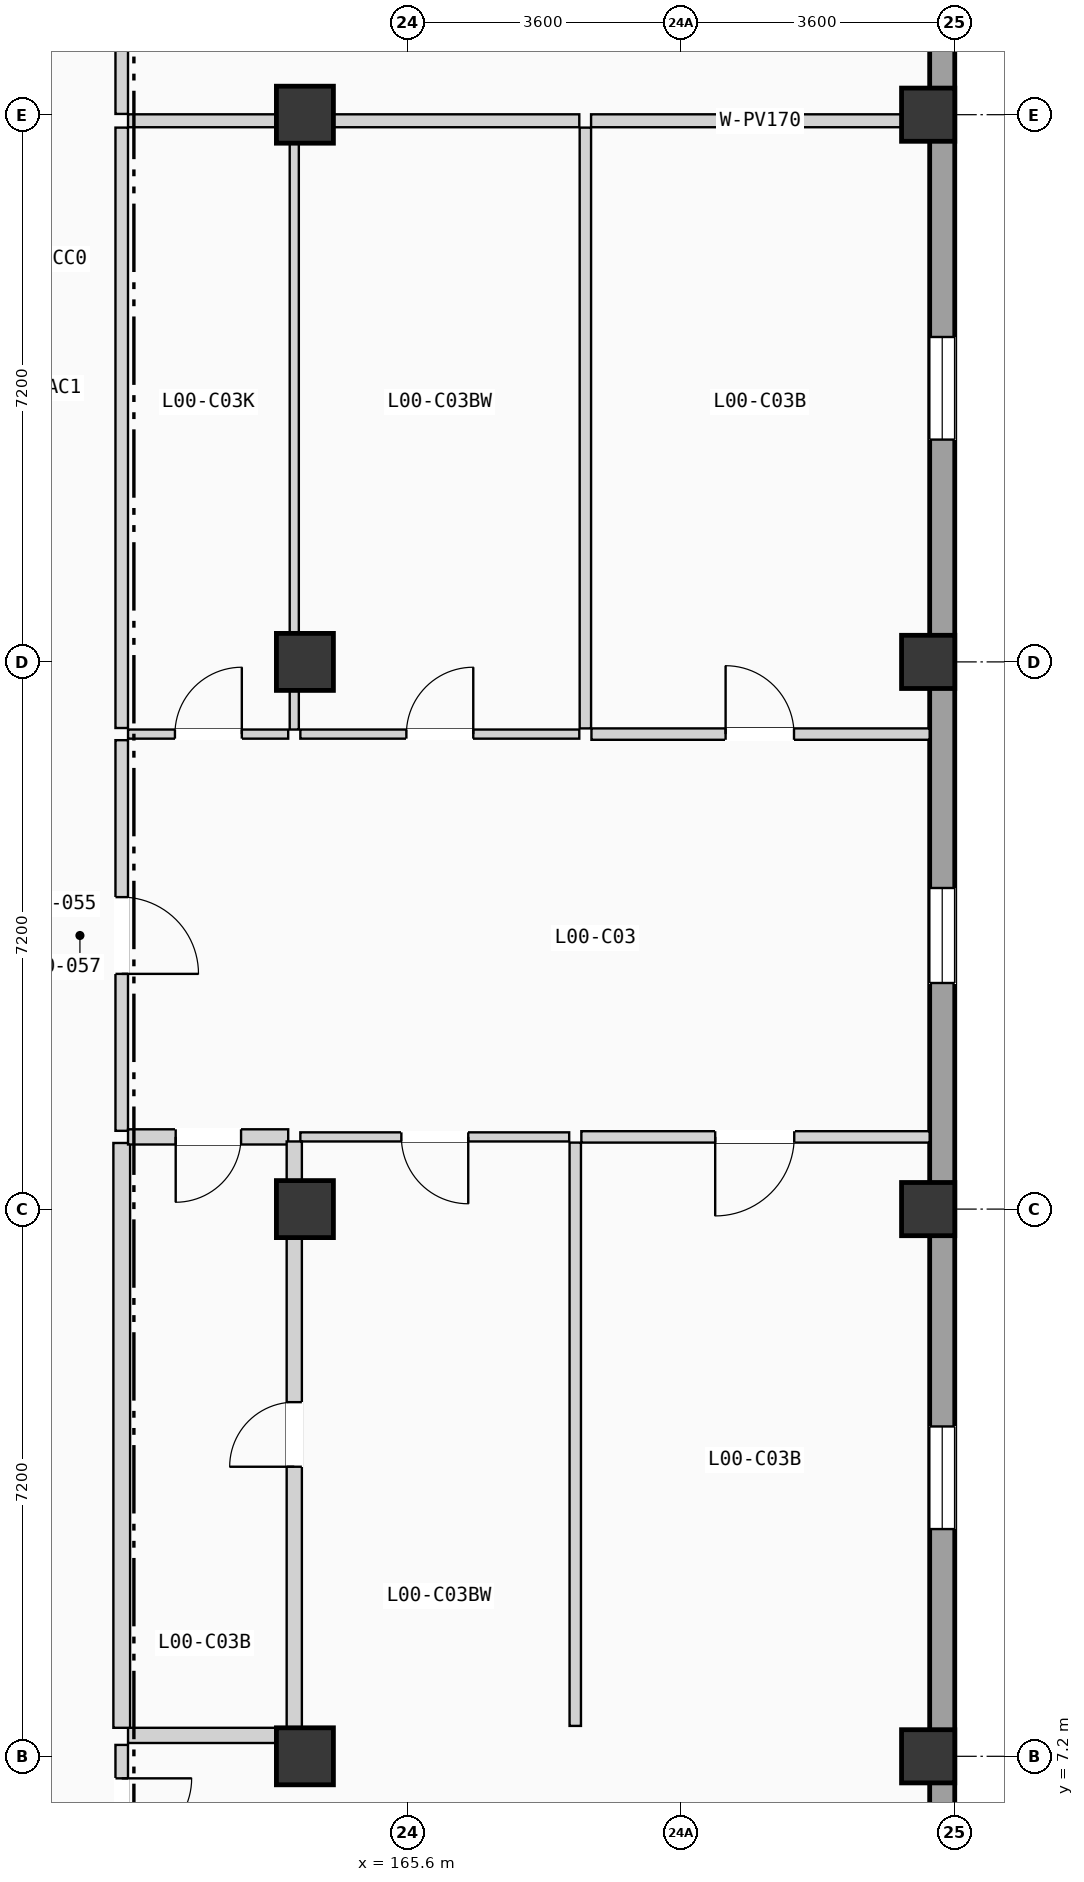
"""IFC4 building model, lengths in metres.
Left out: names, types, materials, properties, quantities, classifications, styles, units other than length and angle.
Written with IfcOpenShell. Run it as: python <this file> out.ifc"""

import sys

from ifc_helpers import new_model, si_unit, direction, frame, frame_2d, origin, origin_2d, place, context, subcontext, project, spatial, rectangle, extrude, element, fill, save


model = new_model("IFC4")
c1 = context("Model", 3, precision=1e-05, world=origin(), true_north=direction((0.0, 1.0)))
c2 = subcontext(c1, "Body", "Model", "MODEL_VIEW")
j1 = project(units=[si_unit("LENGTHUNIT", "METRE"), si_unit("PLANEANGLEUNIT", "RADIAN")], contexts=[c1])
p1 = place(None, origin())
s1 = spatial("IfcSite", under=j1, at=p1, CompositionType="ELEMENT")
p2 = place(p1, origin())
s2 = spatial("IfcBuilding", under=s1, at=p2, CompositionType="ELEMENT")
p3 = place(p2, origin())
s3 = spatial("IfcBuildingStorey", under=s2, at=p3, CompositionType="ELEMENT", Elevation=0.0)
for number, where, z_axis, x_axis in (
    (1, (164.25, 7.2, 0.0), (0.0, 0.0, 1.0), (1.0, 0.0, 0.0)),
    (2, (164.25, 14.4, 0.0), (0.0, 0.0, 1.0), (1.0, 0.0, 0.0)),
    (3, (164.25, 21.6, 0.0), (0.0, 0.0, 1.0), (1.0, 0.0, 0.0)),
    (4, (164.25, 28.8, 0.0), (0.0, 0.0, 1.0), (1.0, 0.0, 0.0)),
):
    element("IfcColumn", number, at=place(p3, frame(where, z_axis=z_axis, x_axis=x_axis)), inside=s3, PredefinedType="COLUMN", context=c2, shape_type="SweptSolid", body=[
        extrude(rectangle(XDim=0.75, YDim=0.75, at=origin_2d()), origin(), (0.0, 0.0, 1.0), 4.9),
    ])
for number, where, z_axis, x_axis in (
    (5, (172.45, 7.2, 0.0), (0.0, 0.0, 1.0), (1.0, 0.0, 0.0)),
    (6, (172.45, 14.4, 0.0), (0.0, 0.0, 1.0), (1.0, 0.0, 0.0)),
    (7, (172.45, 21.6, 0.0), (0.0, 0.0, 1.0), (1.0, 0.0, 0.0)),
    (8, (172.45, 28.8, 0.0), (0.0, 0.0, 1.0), (1.0, 0.0, 0.0)),
):
    element("IfcColumn", number, at=place(p3, frame(where, z_axis=z_axis, x_axis=x_axis)), inside=s3, PredefinedType="COLUMN", context=c2, shape_type="SweptSolid", body=[
        extrude(rectangle(XDim=0.7, YDim=0.7, at=origin_2d()), origin(), (0.0, 0.0, 1.0), 4.9),
    ])
p4 = place(p3, frame((172.635, 0.33, 0.0), z_axis=(0.0, 0.0, 1.0), x_axis=(0.0, 1.0, 0.0)))
e9 = element("IfcWall", 9, at=p4, inside=s3, PredefinedType="SOLIDWALL", context=c2, shape_type="SweptSolid", body=[
    extrude(rectangle(XDim=49.74, YDim=0.33, at=frame_2d((24.87, 0.0))), origin(), (0.0, 0.0, 1.0), 4.64),
])
p5 = place(p4, frame((31.17, 0.0, 0.0)))
e10 = element("IfcOpeningElement", 10, at=p5, cuts=e9, PredefinedType="OPENING", context=c2, shape_type="SweptSolid", body=[
    extrude(rectangle(XDim=1.8, YDim=2.35, at=frame_2d((0.9, 1.175))), frame((0.0, 0.175, 0.0), z_axis=(0.0, -1.0, 0.0), x_axis=(1.0, 0.0, 0.0)), (0.0, 0.0, 1.0), 0.35),
])
p6 = place(p4, frame((17.045, 0.0, 0.9)))
e11 = element("IfcOpeningElement", 11, at=p6, cuts=e9, PredefinedType="OPENING", context=c2, shape_type="SweptSolid", body=[
    extrude(rectangle(XDim=1.25, YDim=1.8, at=frame_2d((0.625, 0.9))), frame((0.0, 0.175, 0.0), z_axis=(0.0, -1.0, 0.0), x_axis=(1.0, 0.0, 0.0)), (0.0, 0.0, 1.0), 0.35),
])
p7 = place(p4, frame((9.86, 0.0, 0.9)))
e12 = element("IfcOpeningElement", 12, at=p7, cuts=e9, PredefinedType="OPENING", context=c2, shape_type="SweptSolid", body=[
    extrude(rectangle(XDim=1.35, YDim=1.2, at=frame_2d((0.675, 0.6))), frame((0.0, 0.175, 0.0), z_axis=(0.0, -1.0, 0.0), x_axis=(1.0, 0.0, 0.0)), (0.0, 0.0, 1.0), 0.35),
])
p8 = place(p4, frame((24.195, 0.0, 0.9)))
e13 = element("IfcOpeningElement", 13, at=p8, cuts=e9, PredefinedType="OPENING", context=c2, shape_type="SweptSolid", body=[
    extrude(rectangle(XDim=1.35, YDim=1.35, at=frame_2d((0.675, 0.675))), frame((0.0, 0.175, 0.0), z_axis=(0.0, -1.0, 0.0), x_axis=(1.0, 0.0, 0.0)), (0.0, 0.0, 1.0), 0.35),
])
p9 = place(p3, frame((161.84, 5.515, 0.0), z_axis=(0.0, 0.0, 1.0), x_axis=(0.0, 1.0, 0.0)))
e14 = element("IfcWall", 14, at=p9, inside=s3, PredefinedType="PARTITIONING", context=c2, shape_type="SweptSolid", body=[
    extrude(rectangle(XDim=1.835, YDim=0.165, at=frame_2d((0.917, 0.0))), origin(), (0.0, 0.0, 1.0), 3.84),
])
p10 = place(p9, frame((0.475, 0.0, 0.0)))
e15 = element("IfcOpeningElement", 15, at=p10, cuts=e14, PredefinedType="OPENING", context=c2, shape_type="SweptSolid", body=[
    extrude(rectangle(XDim=0.92, YDim=2.04, at=frame_2d((0.46, 1.02))), frame((0.0, 0.093, 0.0), z_axis=(0.0, -1.0, 0.0), x_axis=(1.0, 0.0, 0.0)), (0.0, 0.0, 1.0), 0.185),
])
p11 = place(p3, frame((161.923, 7.475, 0.0), z_axis=(0.0, 0.0, 1.0), x_axis=(1.0, 0.0, 0.0)))
e16 = element("IfcWall", 16, at=p11, inside=s3, PredefinedType="PLUMBINGWALL", context=c2, shape_type="SweptSolid", body=[
    extrude(rectangle(XDim=2.107, YDim=0.2, at=frame_2d((1.053, 0.0))), origin(), (0.0, 0.0, 1.0), 3.84),
])
p12 = place(p3, frame((161.84, 15.43, 0.0), z_axis=(0.0, 0.0, 1.0), x_axis=(0.0, 1.0, 0.0)))
e17 = element("IfcWall", 17, at=p12, inside=s3, PredefinedType="PARTITIONING", context=c2, shape_type="SweptSolid", body=[
    extrude(rectangle(XDim=5.14, YDim=0.165, at=frame_2d((2.57, 0.0))), origin(), (0.0, 0.0, 1.0), 3.84),
])
p13 = place(p12, frame((2.065, 0.0, 0.0)))
e18 = element("IfcOpeningElement", 18, at=p13, cuts=e17, PredefinedType="OPENING", context=c2, shape_type="SweptSolid", body=[
    extrude(rectangle(XDim=1.01, YDim=2.11, at=frame_2d((0.505, 1.055))), frame((0.0, 0.093, 0.0), z_axis=(0.0, -1.0, 0.0), x_axis=(1.0, 0.0, 0.0)), (0.0, 0.0, 1.0), 0.185),
])
p14 = place(p3, frame((161.84, 7.575, 0.0), z_axis=(0.0, 0.0, 1.0), x_axis=(0.0, 1.0, 0.0)))
e19 = element("IfcWall", 19, at=p14, inside=s3, PredefinedType="PLUMBINGWALL", context=c2, shape_type="SweptSolid", body=[
    extrude(rectangle(XDim=7.695, YDim=0.22, at=frame_2d((3.848, 0.0))), origin(), (0.0, 0.0, 1.0), 3.84),
])
p15 = place(p3, frame((161.84, 20.73, 0.0), z_axis=(0.0, 0.0, 1.0), x_axis=(0.0, 1.0, 0.0)))
e20 = element("IfcWall", 20, at=p15, inside=s3, PredefinedType="PARTITIONING", context=c2, shape_type="SweptSolid", body=[
    extrude(rectangle(XDim=7.9, YDim=0.165, at=frame_2d((3.95, 0.0))), origin(), (0.0, 0.0, 1.0), 3.84),
])
p16 = place(p3, frame((161.84, 28.81, 0.0), z_axis=(0.0, 0.0, 1.0), x_axis=(0.0, 1.0, 0.0)))
e21 = element("IfcWall", 21, at=p16, inside=s3, PredefinedType="PARTITIONING", context=c2, shape_type="SweptSolid", body=[
    extrude(rectangle(XDim=13.99, YDim=0.165, at=frame_2d((6.995, 0.0))), origin(), (0.0, 0.0, 1.0), 3.84),
])
p17 = place(p16, frame((6.49, 0.0, 0.0)))
e22 = element("IfcOpeningElement", 22, at=p17, cuts=e21, PredefinedType="OPENING", context=c2, shape_type="SweptSolid", body=[
    extrude(rectangle(XDim=1.01, YDim=2.11, at=frame_2d((0.505, 1.055))), frame((0.0, 0.093, 0.0), z_axis=(0.0, -1.0, 0.0), x_axis=(1.0, 0.0, 0.0)), (0.0, 0.0, 1.0), 0.185),
])
p18 = place(p3, frame((161.923, 15.35, 0.0), z_axis=(0.0, 0.0, 1.0), x_axis=(1.0, 0.0, 0.0)))
e23 = element("IfcWall", 23, at=p18, inside=s3, PredefinedType="PLUMBINGWALL", context=c2, shape_type="SweptSolid", body=[
    extrude(rectangle(XDim=2.107, YDim=0.2, at=frame_2d((1.053, 0.0))), origin(), (0.0, 0.0, 1.0), 3.84),
])
p19 = place(p18, frame((0.627, 0.0, 0.0)))
e24 = element("IfcOpeningElement", 24, at=p19, cuts=e23, PredefinedType="OPENING", context=c2, shape_type="SweptSolid", body=[
    extrude(rectangle(XDim=0.86, YDim=2.0, at=frame_2d((0.43, 1.0))), frame((0.0, 0.11, 0.0), z_axis=(0.0, -1.0, 0.0), x_axis=(1.0, 0.0, 0.0)), (0.0, 0.0, 1.0), 0.22),
])
p20 = place(p3, frame((161.923, 20.65, 0.0), z_axis=(0.0, 0.0, 1.0), x_axis=(1.0, 0.0, 0.0)))
e25 = element("IfcWall", 25, at=p20, inside=s3, PredefinedType="PARTITIONING", context=c2, shape_type="SweptSolid", body=[
    extrude(rectangle(XDim=2.107, YDim=0.12, at=frame_2d((1.053, 0.0))), origin(), (0.0, 0.0, 1.0), 3.84),
])
p21 = place(p20, frame((0.617, 0.0, 0.0)))
e26 = element("IfcOpeningElement", 26, at=p21, cuts=e25, PredefinedType="OPENING", context=c2, shape_type="SweptSolid", body=[
    extrude(rectangle(XDim=0.88, YDim=2.02, at=frame_2d((0.44, 1.01))), frame((0.0, 0.07, 0.0), z_axis=(0.0, -1.0, 0.0), x_axis=(1.0, 0.0, 0.0)), (0.0, 0.0, 1.0), 0.14),
])
p22 = place(p3, frame((167.887, 15.35, 0.0), z_axis=(0.0, 0.0, 1.0), x_axis=(1.0, 0.0, 0.0)))
e27 = element("IfcWall", 27, at=p22, inside=s3, PredefinedType="PARTITIONING", context=c2, shape_type="SweptSolid", body=[
    extrude(rectangle(XDim=4.583, YDim=0.15, at=frame_2d((2.292, 0.0))), origin(), (0.0, 0.0, 1.0), 3.84),
])
p23 = place(p22, frame((1.761, 0.0, 0.0)))
e28 = element("IfcOpeningElement", 28, at=p23, cuts=e27, PredefinedType="OPENING", context=c2, shape_type="SweptSolid", body=[
    extrude(rectangle(XDim=1.04, YDim=2.08, at=frame_2d((0.52, 1.04))), frame((0.0, 0.085, 0.0), z_axis=(0.0, -1.0, 0.0), x_axis=(1.0, 0.0, 0.0)), (0.0, 0.0, 1.0), 0.17),
])
p24 = place(p3, frame((164.19, 15.35, 0.0), z_axis=(0.0, 0.0, 1.0), x_axis=(1.0, 0.0, 0.0)))
e29 = element("IfcWall", 29, at=p24, inside=s3, PredefinedType="PARTITIONING", context=c2, shape_type="SweptSolid", body=[
    extrude(rectangle(XDim=3.537, YDim=0.12, at=frame_2d((1.769, 0.0))), origin(), (0.0, 0.0, 1.0), 3.84),
])
p25 = place(p24, frame((1.329, 0.0, 0.0)))
e30 = element("IfcOpeningElement", 30, at=p25, cuts=e29, PredefinedType="OPENING", context=c2, shape_type="SweptSolid", body=[
    extrude(rectangle(XDim=0.88, YDim=2.02, at=frame_2d((0.44, 1.01))), frame((0.0, 0.07, 0.0), z_axis=(0.0, -1.0, 0.0), x_axis=(1.0, 0.0, 0.0)), (0.0, 0.0, 1.0), 0.14),
])
p26 = place(p3, frame((168.02, 20.65, 0.0), z_axis=(0.0, 0.0, 1.0), x_axis=(1.0, 0.0, 0.0)))
e31 = element("IfcWall", 31, at=p26, inside=s3, PredefinedType="PARTITIONING", context=c2, shape_type="SweptSolid", body=[
    extrude(rectangle(XDim=4.45, YDim=0.15, at=frame_2d((2.225, 0.0))), origin(), (0.0, 0.0, 1.0), 3.84),
])
p27 = place(p26, frame((1.765, 0.0, 0.0)))
e32 = element("IfcOpeningElement", 32, at=p27, cuts=e31, PredefinedType="OPENING", context=c2, shape_type="SweptSolid", body=[
    extrude(rectangle(XDim=0.9, YDim=2.04, at=frame_2d((0.45, 1.02))), frame((0.0, 0.085, 0.0), z_axis=(0.0, -1.0, 0.0), x_axis=(1.0, 0.0, 0.0)), (0.0, 0.0, 1.0), 0.17),
])
p28 = place(p3, frame((164.19, 20.65, 0.0), z_axis=(0.0, 0.0, 1.0), x_axis=(1.0, 0.0, 0.0)))
e33 = element("IfcWall", 33, at=p28, inside=s3, PredefinedType="PARTITIONING", context=c2, shape_type="SweptSolid", body=[
    extrude(rectangle(XDim=3.67, YDim=0.12, at=frame_2d((1.835, 0.0))), origin(), (0.0, 0.0, 1.0), 3.84),
])
p29 = place(p28, frame((1.395, 0.0, 0.0)))
e34 = element("IfcOpeningElement", 34, at=p29, cuts=e33, PredefinedType="OPENING", context=c2, shape_type="SweptSolid", body=[
    extrude(rectangle(XDim=0.88, YDim=2.02, at=frame_2d((0.44, 1.01))), frame((0.0, 0.07, 0.0), z_axis=(0.0, -1.0, 0.0), x_axis=(1.0, 0.0, 0.0)), (0.0, 0.0, 1.0), 0.14),
])
p30 = place(p3, frame((164.11, 7.575, 0.0), z_axis=(0.0, 0.0, 1.0), x_axis=(0.0, 1.0, 0.0)))
e35 = element("IfcWall", 35, at=p30, inside=s3, PredefinedType="PLUMBINGWALL", context=c2, shape_type="SweptSolid", body=[
    extrude(rectangle(XDim=7.715, YDim=0.2, at=frame_2d((3.857, 0.0))), origin(), (0.0, 0.0, 1.0), 3.84),
])
p31 = place(p30, frame((3.435, 0.0, 0.0)))
e36 = element("IfcOpeningElement", 36, at=p31, cuts=e35, PredefinedType="OPENING", context=c2, shape_type="SweptSolid", body=[
    extrude(rectangle(XDim=0.85, YDim=2.01, at=frame_2d((0.425, 1.005))), frame((0.0, 0.11, 0.0), z_axis=(0.0, -1.0, 0.0), x_axis=(1.0, 0.0, 0.0)), (0.0, 0.0, 1.0), 0.22),
])
p32 = place(p3, frame((164.11, 20.71, 0.0), z_axis=(0.0, 0.0, 1.0), x_axis=(0.0, 1.0, 0.0)))
e37 = element("IfcWall", 37, at=p32, inside=s3, PredefinedType="PARTITIONING", context=c2, shape_type="SweptSolid", body=[
    extrude(rectangle(XDim=7.92, YDim=0.12, at=frame_2d((3.96, 0.0))), origin(), (0.0, 0.0, 1.0), 3.84),
])
p33 = place(p3, frame((161.923, 28.72, 0.0), z_axis=(0.0, 0.0, 1.0), x_axis=(1.0, 0.0, 0.0)))
e38 = element("IfcWall", 38, at=p33, inside=s3, PredefinedType="PARTITIONING", context=c2, shape_type="SweptSolid", body=[
    extrude(rectangle(XDim=2.127, YDim=0.17, at=frame_2d((1.063, 0.0))), origin(), (0.0, 0.0, 1.0), 3.84),
])
p34 = place(p3, frame((167.807, 7.6, 0.0), z_axis=(0.0, 0.0, 1.0), x_axis=(0.0, 1.0, 0.0)))
e39 = element("IfcWall", 39, at=p34, inside=s3, PredefinedType="PARTITIONING", context=c2, shape_type="SweptSolid", body=[
    extrude(rectangle(XDim=7.675, YDim=0.15, at=frame_2d((3.837, 0.0))), origin(), (0.0, 0.0, 1.0), 3.84),
])
p35 = place(p3, frame((167.94, 20.725, 0.0), z_axis=(0.0, 0.0, 1.0), x_axis=(0.0, 1.0, 0.0)))
e40 = element("IfcWall", 40, at=p35, inside=s3, PredefinedType="PARTITIONING", context=c2, shape_type="SweptSolid", body=[
    extrude(rectangle(XDim=7.905, YDim=0.15, at=frame_2d((3.952, 0.0))), origin(), (0.0, 0.0, 1.0), 3.84),
])
p36 = place(p3, frame((168.015, 28.72, 0.0), z_axis=(0.0, 0.0, 1.0), x_axis=(1.0, 0.0, 0.0)))
e41 = element("IfcWall", 41, at=p36, inside=s3, PredefinedType="PARTITIONING", context=c2, shape_type="SweptSolid", body=[
    extrude(rectangle(XDim=4.455, YDim=0.17, at=frame_2d((2.228, 0.0))), origin(), (0.0, 0.0, 1.0), 3.84),
])
p37 = place(p3, frame((164.17, 28.72, 0.0), z_axis=(0.0, 0.0, 1.0), x_axis=(1.0, 0.0, 0.0)))
e42 = element("IfcWall", 42, at=p37, inside=s3, PredefinedType="PARTITIONING", context=c2, shape_type="SweptSolid", body=[
    extrude(rectangle(XDim=3.69, YDim=0.17, at=frame_2d((1.845, 0.0))), origin(), (0.0, 0.0, 1.0), 3.84),
])
p38 = place(p6, origin())
e43 = element("IfcWindow", 43, at=p38, inside=s3, PartitioningType="SINGLE_PANEL", PredefinedType="WINDOW", context=c2, shape_type="SweptSolid", body=[
    extrude(rectangle(XDim=1.25, YDim=1.8, at=frame_2d((0.625, 0.9))), frame((0.0, 0.03, 0.0), z_axis=(0.0, -1.0, 0.0), x_axis=(1.0, 0.0, 0.0)), (0.0, 0.0, 1.0), 0.06),
])
fill(e11, e43)
p39 = place(p7, origin())
e44 = element("IfcWindow", 44, at=p39, inside=s3, PartitioningType="SINGLE_PANEL", PredefinedType="WINDOW", context=c2, shape_type="SweptSolid", body=[
    extrude(rectangle(XDim=1.35, YDim=1.2, at=frame_2d((0.675, 0.6))), frame((0.0, 0.03, 0.0), z_axis=(0.0, -1.0, 0.0), x_axis=(1.0, 0.0, 0.0)), (0.0, 0.0, 1.0), 0.06),
])
fill(e12, e44)
p40 = place(p8, origin())
e45 = element("IfcWindow", 45, at=p40, inside=s3, PartitioningType="SINGLE_PANEL", PredefinedType="WINDOW", context=c2, shape_type="SweptSolid", body=[
    extrude(rectangle(XDim=1.35, YDim=1.35, at=frame_2d((0.675, 0.675))), frame((0.0, 0.03, 0.0), z_axis=(0.0, -1.0, 0.0), x_axis=(1.0, 0.0, 0.0)), (0.0, 0.0, 1.0), 0.06),
])
fill(e13, e45)
p41 = place(p10, frame((0.92, 0.0, 0.0), z_axis=(0.0, 0.0, 1.0), x_axis=(-1.0, 0.0, 0.0)))
e46 = element("IfcDoor", 46, at=p41, inside=s3, OperationType="SINGLE_SWING_RIGHT", PredefinedType="DOOR", context=c2, shape_type="SweptSolid", body=[
    extrude(rectangle(XDim=0.92, YDim=2.04, at=frame_2d((0.46, 1.02))), frame((0.0, 0.025, 0.0), z_axis=(0.0, -1.0, 0.0), x_axis=(1.0, 0.0, 0.0)), (0.0, 0.0, 1.0), 0.05),
])
fill(e15, e46)
p42 = place(p13, frame((1.01, 0.0, 0.0), z_axis=(0.0, 0.0, 1.0), x_axis=(-1.0, 0.0, 0.0)))
e47 = element("IfcDoor", 47, at=p42, inside=s3, OperationType="SINGLE_SWING_LEFT", PredefinedType="DOOR", context=c2, shape_type="SweptSolid", body=[
    extrude(rectangle(XDim=1.01, YDim=2.11, at=frame_2d((0.505, 1.055))), frame((0.0, 0.025, 0.0), z_axis=(0.0, -1.0, 0.0), x_axis=(1.0, 0.0, 0.0)), (0.0, 0.0, 1.0), 0.05),
])
fill(e18, e47)
p43 = place(p19, frame((0.86, 0.0, 0.0), z_axis=(0.0, 0.0, 1.0), x_axis=(-1.0, 0.0, 0.0)))
e48 = element("IfcDoor", 48, at=p43, inside=s3, OperationType="SINGLE_SWING_LEFT", PredefinedType="DOOR", context=c2, shape_type="SweptSolid", body=[
    extrude(rectangle(XDim=0.86, YDim=2.0, at=frame_2d((0.43, 1.0))), frame((0.0, 0.025, 0.0), z_axis=(0.0, -1.0, 0.0), x_axis=(1.0, 0.0, 0.0)), (0.0, 0.0, 1.0), 0.05),
])
fill(e24, e48)
p44 = place(p21, origin())
e49 = element("IfcDoor", 49, at=p44, inside=s3, OperationType="SINGLE_SWING_RIGHT", PredefinedType="DOOR", context=c2, shape_type="SweptSolid", body=[
    extrude(rectangle(XDim=0.88, YDim=2.02, at=frame_2d((0.44, 1.01))), frame((0.0, 0.025, 0.0), z_axis=(0.0, -1.0, 0.0), x_axis=(1.0, 0.0, 0.0)), (0.0, 0.0, 1.0), 0.05),
])
fill(e26, e49)
p45 = place(p23, frame((1.04, 0.0, 0.0), z_axis=(0.0, 0.0, 1.0), x_axis=(-1.0, 0.0, 0.0)))
e50 = element("IfcDoor", 50, at=p45, inside=s3, OperationType="SINGLE_SWING_LEFT", PredefinedType="DOOR", context=c2, shape_type="SweptSolid", body=[
    extrude(rectangle(XDim=1.04, YDim=2.08, at=frame_2d((0.52, 1.04))), frame((0.0, 0.025, 0.0), z_axis=(0.0, -1.0, 0.0), x_axis=(1.0, 0.0, 0.0)), (0.0, 0.0, 1.0), 0.05),
])
fill(e28, e50)
p46 = place(p25, frame((0.88, 0.0, 0.0), z_axis=(0.0, 0.0, 1.0), x_axis=(-1.0, 0.0, 0.0)))
e51 = element("IfcDoor", 51, at=p46, inside=s3, OperationType="SINGLE_SWING_RIGHT", PredefinedType="DOOR", context=c2, shape_type="SweptSolid", body=[
    extrude(rectangle(XDim=0.88, YDim=2.02, at=frame_2d((0.44, 1.01))), frame((0.0, 0.025, 0.0), z_axis=(0.0, -1.0, 0.0), x_axis=(1.0, 0.0, 0.0)), (0.0, 0.0, 1.0), 0.05),
])
fill(e30, e51)
p47 = place(p27, origin())
e52 = element("IfcDoor", 52, at=p47, inside=s3, OperationType="SINGLE_SWING_LEFT", PredefinedType="DOOR", context=c2, shape_type="SweptSolid", body=[
    extrude(rectangle(XDim=0.9, YDim=2.04, at=frame_2d((0.45, 1.02))), frame((0.0, 0.025, 0.0), z_axis=(0.0, -1.0, 0.0), x_axis=(1.0, 0.0, 0.0)), (0.0, 0.0, 1.0), 0.05),
])
fill(e32, e52)
p48 = place(p29, origin())
e53 = element("IfcDoor", 53, at=p48, inside=s3, OperationType="SINGLE_SWING_RIGHT", PredefinedType="DOOR", context=c2, shape_type="SweptSolid", body=[
    extrude(rectangle(XDim=0.88, YDim=2.02, at=frame_2d((0.44, 1.01))), frame((0.0, 0.025, 0.0), z_axis=(0.0, -1.0, 0.0), x_axis=(1.0, 0.0, 0.0)), (0.0, 0.0, 1.0), 0.05),
])
fill(e34, e53)
p49 = place(p31, origin())
e54 = element("IfcDoor", 54, at=p49, inside=s3, OperationType="SINGLE_SWING_LEFT", PredefinedType="DOOR", context=c2, shape_type="SweptSolid", body=[
    extrude(rectangle(XDim=0.85, YDim=2.01, at=frame_2d((0.425, 1.005))), frame((0.0, 0.025, 0.0), z_axis=(0.0, -1.0, 0.0), x_axis=(1.0, 0.0, 0.0)), (0.0, 0.0, 1.0), 0.05),
])
fill(e36, e54)
save(model, sys.argv[1])
